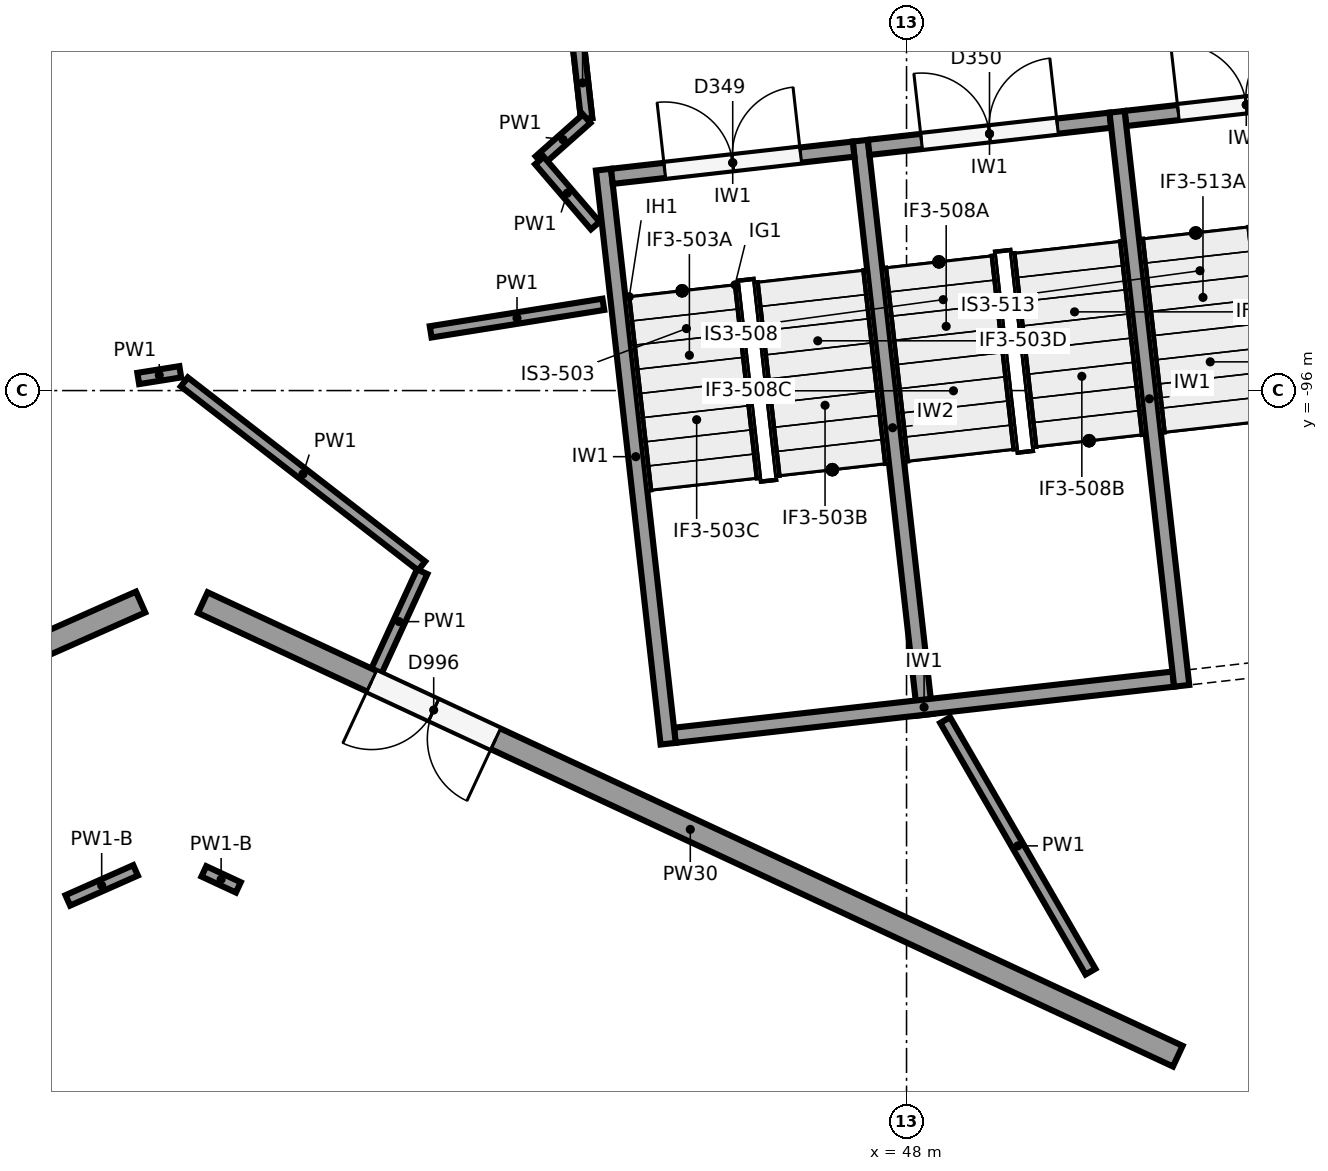
"""IFC4 building model, lengths in metres.
Left out: names, types, materials, properties, quantities, classifications, styles, units other than length and angle.
Written with IfcOpenShell. Run it as: python <this file> out.ifc"""

import sys

from ifc_helpers import new_model, si_unit, direction, frame, frame_2d, origin, origin_2d, place, context, subcontext, project, spatial, rectangle, circle, extrude, element, fill, save


model = new_model("IFC4")
c1 = context("Model", 3, precision=1e-05, world=origin(), true_north=direction((0.0, 1.0)))
c2 = subcontext(c1, "Body", "Model", "MODEL_VIEW")
j1 = project(units=[si_unit("LENGTHUNIT", "METRE"), si_unit("PLANEANGLEUNIT", "RADIAN")], contexts=[c1])
p1 = place(None, origin())
s1 = spatial("IfcSite", under=j1, at=p1, CompositionType="ELEMENT")
p2 = place(p1, origin())
s2 = spatial("IfcBuilding", under=s1, at=p2, CompositionType="ELEMENT")
p3 = place(p2, frame((0.0, 0.0, 6.5)))
s3 = spatial("IfcBuildingStorey", under=s2, at=p3, CompositionType="ELEMENT", Elevation=6.5)
p4 = place(p3, frame((38.333, -98.6, 0.0), z_axis=(0.0, 0.0, 1.0), x_axis=(1.0, 0.0, 0.0)))
e1 = element("IfcColumn", 1, at=p4, inside=s3, PredefinedType="COLUMN", context=c2, shape_type="SweptSolid", body=[
    extrude(circle(Radius=0.45, at=origin_2d()), origin(), (0.0, 0.0, 1.0), 5.5),
])
p5 = place(p3, frame((44.683, -91.091, 0.0), z_axis=(0.0, 0.0, 1.0), x_axis=(1.0, 0.0, 0.0)))
e2 = element("IfcColumn", 2, at=p5, inside=s3, PredefinedType="COLUMN", context=c2, shape_type="SweptSolid", body=[
    extrude(circle(Radius=0.55, at=origin_2d()), origin(), (0.0, 0.0, 1.0), 5.5),
])
p6 = place(p3, frame((52.203, -105.052, 0.0), z_axis=(0.0, 0.0, 1.0), x_axis=(1.0, 0.0, 0.0)))
e3 = element("IfcColumn", 3, at=p6, inside=s3, PredefinedType="COLUMN", context=c2, shape_type="SweptSolid", body=[
    extrude(circle(Radius=0.7, at=origin_2d()), origin(), (0.0, 0.0, 1.0), 5.5),
])
p7 = place(p3, frame((38.333, -102.6, 0.0), z_axis=(0.0, 0.0, 1.0), x_axis=(1.0, 0.0, 0.0)))
e4 = element("IfcColumn", 4, at=p7, inside=s3, PredefinedType="COLUMN", context=c2, shape_type="SweptSolid", body=[
    extrude(circle(Radius=0.4, at=origin_2d()), origin(), (0.0, 0.0, 1.0), 5.5),
])
p8 = place(p3, frame((37.922, -98.782, 0.0), z_axis=(0.0, 0.0, 1.0), x_axis=(-0.914138897099, -0.405401130748, 0.0)))
e5 = element("IfcWall", 5, at=p8, inside=s3, PredefinedType="SOLIDWALL", context=c2, shape_type="SweptSolid", body=[
    extrude(rectangle(XDim=15.824, YDim=0.3, at=frame_2d((7.912, 0.0))), origin(), (0.0, 0.0, 1.0), 3.85),
])
p9 = place(p3, frame((51.569, -104.757, 0.0), z_axis=(0.0, 0.0, 1.0), x_axis=(-0.906698705786, 0.421778919491, 0.0)))
e6 = element("IfcWall", 6, at=p9, inside=s3, PredefinedType="SOLIDWALL", context=c2, shape_type="SweptSolid", body=[
    extrude(rectangle(XDim=14.148, YDim=0.3, at=frame_2d((7.074, 0.0))), origin(), (0.0, 0.0, 1.0), 3.85),
])
p10 = place(p9, frame((9.897, 0.0, 0.0)))
e7 = element("IfcOpeningElement", 7, at=p10, cuts=e6, PredefinedType="OPENING", context=c2, shape_type="SweptSolid", body=[
    extrude(rectangle(XDim=1.8, YDim=2.4, at=frame_2d((0.9, 1.2))), frame((0.0, 0.16, 0.0), z_axis=(0.0, -1.0, 0.0), x_axis=(1.0, 0.0, 0.0)), (0.0, 0.0, 1.0), 0.32),
])
p11 = place(p3, frame((44.863, -100.646, 0.0), z_axis=(0.0, 0.0, 1.0), x_axis=(-0.111951003472, 0.993713727802, 0.0)))
e8 = element("IfcWall", 8, at=p11, inside=s3, PredefinedType="SHEAR", context=c2, shape_type="SweptSolid", body=[
    extrude(rectangle(XDim=7.6, YDim=0.2, at=frame_2d((3.8, 0.0))), origin(), (0.0, 0.0, 1.0), 5.15),
])
p12 = place(p3, frame((51.621, -99.885, 0.0), z_axis=(0.0, 0.0, 1.0), x_axis=(-0.111947429915, 0.993714130389, 0.0)))
e9 = element("IfcWall", 9, at=p12, inside=s3, PredefinedType="SHEAR", context=c2, shape_type="SweptSolid", body=[
    extrude(rectangle(XDim=7.6, YDim=0.2, at=frame_2d((3.8, 0.0))), origin(), (0.0, 0.0, 1.0), 5.15),
])
for number, where, z_axis, x_axis in (
    (10, (44.951, -100.535, 0.0), (0.0, 0.0, 1.0), (0.994, 0.112, 0.0)),
    (11, (51.709, -99.774, 0.0), (0.0, 0.0, 1.0), (0.994, 0.112, 0.0)),
):
    element("IfcWall", number, at=place(p3, frame(where, z_axis=z_axis, x_axis=x_axis)), inside=s3, PredefinedType="SHEAR", context=c2, shape_type="SweptSolid", body=[
        extrude(rectangle(XDim=6.6, YDim=0.2, at=frame_2d((3.3, 0.0))), origin(), (0.0, 0.0, 1.0), 5.15),
    ])
p13 = place(p3, frame((48.242, -100.265, 0.0), z_axis=(0.0, 0.0, 1.0), x_axis=(-0.111954577255, 0.993713325176, 0.0)))
e12 = element("IfcWall", 12, at=p13, inside=s3, PredefinedType="SHEAR", context=c2, shape_type="SweptSolid", body=[
    extrude(rectangle(XDim=7.6, YDim=0.2, at=frame_2d((3.8, 0.0))), origin(), (0.0, 0.0, 1.0), 5.15),
])
p14 = place(p3, frame((44.123, -93.182, 0.0), z_axis=(0.0, 0.0, 1.0), x_axis=(0.993717005286, 0.11192190762, 0.0)))
e13 = element("IfcWall", 13, at=p14, inside=s3, PredefinedType="SHEAR", context=c2, shape_type="SweptSolid", body=[
    extrude(rectangle(XDim=3.2, YDim=0.2, at=frame_2d((1.6, 0.0))), origin(), (0.0, 0.0, 1.0), 5.15),
])
p15 = place(p14, frame((0.7, 0.0, 0.0)))
e14 = element("IfcOpeningElement", 14, at=p15, cuts=e13, PredefinedType="OPENING", context=c2, shape_type="SweptSolid", body=[
    extrude(rectangle(XDim=1.8, YDim=2.1, at=frame_2d((0.9, 1.05))), frame((0.0, 0.11, 0.0), z_axis=(0.0, -1.0, 0.0), x_axis=(1.0, 0.0, 0.0)), (0.0, 0.0, 1.0), 0.22),
])
p16 = place(p3, frame((47.502, -92.801, 0.0), z_axis=(0.0, 0.0, 1.0), x_axis=(0.993707560215, 0.112005735442, 0.0)))
e15 = element("IfcWall", 15, at=p16, inside=s3, PredefinedType="SHEAR", context=c2, shape_type="SweptSolid", body=[
    extrude(rectangle(XDim=3.2, YDim=0.2, at=frame_2d((1.6, 0.0))), origin(), (0.0, 0.0, 1.0), 5.15),
])
p17 = place(p16, frame((0.7, 0.0, 0.0)))
e16 = element("IfcOpeningElement", 16, at=p17, cuts=e15, PredefinedType="OPENING", context=c2, shape_type="SweptSolid", body=[
    extrude(rectangle(XDim=1.8, YDim=2.1, at=frame_2d((0.9, 1.05))), frame((0.0, 0.11, 0.0), z_axis=(0.0, -1.0, 0.0), x_axis=(1.0, 0.0, 0.0)), (0.0, 0.0, 1.0), 0.22),
])
p18 = place(p3, frame((50.88, -92.42, 0.0), z_axis=(0.0, 0.0, 1.0), x_axis=(0.993707560215, 0.112005735442, 0.0)))
e17 = element("IfcWall", 17, at=p18, inside=s3, PredefinedType="SHEAR", context=c2, shape_type="SweptSolid", body=[
    extrude(rectangle(XDim=3.2, YDim=0.2, at=frame_2d((1.6, 0.0))), origin(), (0.0, 0.0, 1.0), 5.15),
])
p19 = place(p18, frame((0.7, 0.0, 0.0)))
e18 = element("IfcOpeningElement", 18, at=p19, cuts=e17, PredefinedType="OPENING", context=c2, shape_type="SweptSolid", body=[
    extrude(rectangle(XDim=1.8, YDim=2.1, at=frame_2d((0.9, 1.05))), frame((0.0, 0.11, 0.0), z_axis=(0.0, -1.0, 0.0), x_axis=(1.0, 0.0, 0.0)), (0.0, 0.0, 1.0), 0.22),
])
p20 = place(p3, frame((37.891, -95.841, 0.0), z_axis=(0.0, 0.0, 1.0), x_axis=(0.987546472481, 0.1573275713, 0.0)))
e19 = element("IfcWall", 19, at=p20, inside=s3, PredefinedType="PARTITIONING", context=c2, shape_type="SweptSolid", body=[
    extrude(rectangle(XDim=0.56, YDim=0.15, at=frame_2d((0.28, 0.0))), origin(), (0.0, 0.0, 1.0), 5.15),
])
p21 = place(p3, frame((48.508, -100.336, 0.0), z_axis=(0.0, 0.0, 1.0), x_axis=(0.500439359674, -0.865771590715, 0.0)))
e20 = element("IfcWall", 20, at=p21, inside=s3, PredefinedType="PARTITIONING", context=c2, shape_type="SweptSolid", body=[
    extrude(rectangle(XDim=3.822, YDim=0.15, at=frame_2d((1.911, 0.0))), origin(), (0.0, 0.0, 1.0), 5.15),
])
p22 = place(p3, frame((36.965, -102.708, 0.0), z_axis=(0.0, 0.0, 1.0), x_axis=(0.914193086295, 0.4052789175, 0.0)))
e21 = element("IfcWall", 21, at=p22, inside=s3, PredefinedType="PARTITIONING", context=c2, shape_type="SweptSolid", body=[
    extrude(rectangle(XDim=0.975, YDim=0.15, at=frame_2d((0.488, 0.0))), origin(), (0.0, 0.0, 1.0), 5.05),
])
p23 = place(p3, frame((38.755, -102.325, 0.0), z_axis=(0.0, 0.0, 1.0), x_axis=(0.906755828453, -0.421656101067, 0.0)))
e22 = element("IfcWall", 22, at=p23, inside=s3, PredefinedType="PARTITIONING", context=c2, shape_type="SweptSolid", body=[
    extrude(rectangle(XDim=0.5, YDim=0.15, at=frame_2d((0.25, 0.0))), origin(), (0.0, 0.0, 1.0), 5.05),
])
p24 = place(p3, frame((38.498, -95.886, 0.0), z_axis=(0.0, 0.0, 1.0), x_axis=(0.790219801195, -0.612823519294, 0.0)))
e23 = element("IfcWall", 23, at=p24, inside=s3, PredefinedType="PARTITIONING", context=c2, shape_type="SweptSolid", body=[
    extrude(rectangle(XDim=3.951, YDim=0.15, at=frame_2d((1.976, 0.0))), origin(), (0.0, 0.0, 1.0), 5.15),
])
p25 = place(p3, frame((41.627, -98.383, 0.0), z_axis=(0.0, 0.0, 1.0), x_axis=(-0.418008717052, -0.908443015532, 0.0)))
e24 = element("IfcWall", 24, at=p25, inside=s3, PredefinedType="PARTITIONING", context=c2, shape_type="SweptSolid", body=[
    extrude(rectangle(XDim=1.446, YDim=0.15, at=frame_2d((0.723, 0.0))), origin(), (0.0, 0.0, 1.0), 5.15),
])
p26 = place(p3, frame((41.739, -95.228, 0.0), z_axis=(0.0, 0.0, 1.0), x_axis=(0.987519978733, 0.157493782745, 0.0)))
e25 = element("IfcWall", 25, at=p26, inside=s3, PredefinedType="PARTITIONING", context=c2, shape_type="SweptSolid", body=[
    extrude(rectangle(XDim=2.301, YDim=0.15, at=frame_2d((1.15, 0.0))), origin(), (0.0, 0.0, 1.0), 5.15),
])
p27 = place(p3, frame((43.154, -86.767, 0.0), z_axis=(0.0, 0.0, 1.0), x_axis=(0.111980060209, -0.993710453863, 0.0)))
e26 = element("IfcWall", 26, at=p27, inside=s3, PredefinedType="PARTITIONING", context=c2, shape_type="SweptSolid", body=[
    extrude(rectangle(XDim=5.693, YDim=0.15, at=frame_2d((2.846, 0.0))), origin(), (0.0, 0.0, 1.0), 4.05),
])
p28 = place(p27, frame((2.05, 0.0, 0.0)))
e27 = element("IfcOpeningElement", 27, at=p28, cuts=e26, PredefinedType="OPENING", context=c2, shape_type="SweptSolid", body=[
    extrude(rectangle(XDim=1.8, YDim=2.1, at=frame_2d((0.9, 1.05))), frame((0.0, 0.085, 0.0), z_axis=(0.0, -1.0, 0.0), x_axis=(1.0, 0.0, 0.0)), (0.0, 0.0, 1.0), 0.17),
])
p29 = place(p3, frame((43.685, -91.481, 4.05), z_axis=(0.0, 0.0, 1.0), x_axis=(0.11195679558, -0.99371307525, 0.0)))
e28 = element("IfcWall", 28, at=p29, inside=s3, PredefinedType="PARTITIONING", context=c2, shape_type="SweptSolid", body=[
    extrude(rectangle(XDim=0.948, YDim=0.15, at=frame_2d((0.474, 0.0))), origin(), (0.0, 0.0, 1.0), 1.1),
])
p30 = place(p3, frame((43.791, -92.423, 0.0), z_axis=(0.0, 0.0, 1.0), x_axis=(-0.748350259109, -0.66330376879, 0.0)))
e29 = element("IfcWall", 29, at=p30, inside=s3, PredefinedType="PARTITIONING", context=c2, shape_type="SweptSolid", body=[
    extrude(rectangle(XDim=0.83, YDim=0.15, at=frame_2d((0.415, 0.0))), origin(), (0.0, 0.0, 1.0), 5.15),
])
p31 = place(p3, frame((43.17, -92.974, 0.0), z_axis=(0.0, 0.0, 1.0), x_axis=(0.651040876816, -0.759042671208, 0.0)))
e30 = element("IfcWall", 30, at=p31, inside=s3, PredefinedType="PARTITIONING", context=c2, shape_type="SweptSolid", body=[
    extrude(rectangle(XDim=1.128, YDim=0.15, at=frame_2d((0.564, 0.0))), origin(), (0.0, 0.0, 1.0), 5.15),
])
p32 = place(p10, origin())
e31 = element("IfcDoor", 31, at=p32, inside=s3, OperationType="DOUBLE_DOOR_SINGLE_SWING", PredefinedType="DOOR", context=c2, shape_type="SweptSolid", body=[
    extrude(rectangle(XDim=1.8, YDim=2.4, at=frame_2d((0.9, 1.2))), frame((0.0, 0.025, 0.0), z_axis=(0.0, -1.0, 0.0), x_axis=(1.0, 0.0, 0.0)), (0.0, 0.0, 1.0), 0.05),
])
fill(e7, e31)
p33 = place(p15, origin())
e32 = element("IfcDoor", 32, at=p33, inside=s3, OperationType="DOUBLE_DOOR_SINGLE_SWING", PredefinedType="DOOR", context=c2, shape_type="SweptSolid", body=[
    extrude(rectangle(XDim=1.8, YDim=2.1, at=frame_2d((0.9, 1.05))), frame((0.0, 0.025, 0.0), z_axis=(0.0, -1.0, 0.0), x_axis=(1.0, 0.0, 0.0)), (0.0, 0.0, 1.0), 0.05),
])
fill(e14, e32)
p34 = place(p17, origin())
e33 = element("IfcDoor", 33, at=p34, inside=s3, OperationType="DOUBLE_DOOR_SINGLE_SWING", PredefinedType="DOOR", context=c2, shape_type="SweptSolid", body=[
    extrude(rectangle(XDim=1.8, YDim=2.1, at=frame_2d((0.9, 1.05))), frame((0.0, 0.025, 0.0), z_axis=(0.0, -1.0, 0.0), x_axis=(1.0, 0.0, 0.0)), (0.0, 0.0, 1.0), 0.05),
])
fill(e16, e33)
p35 = place(p19, origin())
e34 = element("IfcDoor", 34, at=p35, inside=s3, OperationType="DOUBLE_DOOR_SINGLE_SWING", PredefinedType="DOOR", context=c2, shape_type="SweptSolid", body=[
    extrude(rectangle(XDim=1.8, YDim=2.1, at=frame_2d((0.9, 1.05))), frame((0.0, 0.025, 0.0), z_axis=(0.0, -1.0, 0.0), x_axis=(1.0, 0.0, 0.0)), (0.0, 0.0, 1.0), 0.05),
])
fill(e18, e34)
save(model, sys.argv[1])
